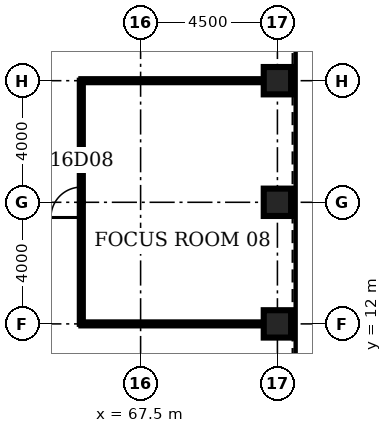
"""IFC4 building model, lengths in metres.
Left out: names, types, materials, properties, quantities, classifications, styles, units other than length and angle.
Written with IfcOpenShell. Run it as: python <this file> out.ifc"""

import sys

from ifc_helpers import new_model, si_unit, direction, frame, frame_2d, origin, origin_2d, place, context, subcontext, project, spatial, rectangle, hollow_rectangle, extrude, element, fill, save


model = new_model("IFC4")
c1 = context("Model", 3, precision=1e-05, world=origin(), true_north=direction((0.0, 1.0)))
c2 = subcontext(c1, "Body", "Model", "MODEL_VIEW")
j1 = project(units=[si_unit("LENGTHUNIT", "METRE"), si_unit("PLANEANGLEUNIT", "RADIAN")], contexts=[c1])
p1 = place(None, origin())
s1 = spatial("IfcSite", under=j1, at=p1, CompositionType="ELEMENT")
p2 = place(p1, origin())
s2 = spatial("IfcBuilding", under=s1, at=p2, CompositionType="ELEMENT")
p3 = place(p2, frame((0.0, 0.0, 77.0)))
s3 = spatial("IfcBuildingStorey", under=s2, at=p3, CompositionType="ELEMENT", Elevation=77.0)
for number, where, z_axis, x_axis in (
    (1, (72.0, 12.0, 0.0), (0.0, 0.0, 1.0), (1.0, 0.0, 0.0)),
    (2, (72.0, 16.0, 0.0), (0.0, 0.0, 1.0), (1.0, 0.0, 0.0)),
    (3, (72.0, 20.0, 0.0), (0.0, 0.0, 1.0), (1.0, 0.0, 0.0)),
):
    element("IfcColumn", number, at=place(p3, frame(where, z_axis=z_axis, x_axis=x_axis)), inside=s3, PredefinedType="COLUMN", context=c2, shape_type="SweptSolid", body=[
        extrude(hollow_rectangle(XDim=0.9, YDim=0.9, WallThickness=0.11, at=origin_2d()), origin(), (0.0, 0.0, 1.0), 4.5),
    ])
for number, where, z_axis, x_axis in (
    (4, (65.55, 12.0, 0.0), (0.0, 0.0, 1.0), (1.0, 0.0, 0.0)),
    (5, (65.55, 20.0, 0.0), (0.0, 0.0, 1.0), (1.0, 0.0, 0.0)),
):
    element("IfcWall", number, at=place(p3, frame(where, z_axis=z_axis, x_axis=x_axis)), inside=s3, PredefinedType="PARTITIONING", context=c2, shape_type="SweptSolid", body=[
        extrude(rectangle(XDim=6.0, YDim=0.1, at=frame_2d((3.0, 0.0))), origin(), (0.0, 0.0, 1.0), 3.0),
    ])
p4 = place(p3, frame((65.55, 12.0, 0.0), z_axis=(0.0, 0.0, 1.0), x_axis=(0.0, 1.0, 0.0)))
e6 = element("IfcWall", 6, at=p4, inside=s3, PredefinedType="PARTITIONING", context=c2, shape_type="SweptSolid", body=[
    extrude(rectangle(XDim=8.0, YDim=0.1, at=frame_2d((4.0, 0.0))), origin(), (0.0, 0.0, 1.0), 3.0),
])
p5 = place(p4, frame((3.5, 0.0, 0.0)))
e7 = element("IfcOpeningElement", 7, at=p5, cuts=e6, PredefinedType="OPENING", context=c2, shape_type="SweptSolid", body=[
    extrude(rectangle(XDim=1.0, YDim=2.1, at=frame_2d((0.5, 1.05))), frame((0.0, 0.06, 0.0), z_axis=(0.0, -1.0, 0.0), x_axis=(1.0, 0.0, 0.0)), (0.0, 0.0, 1.0), 0.12),
])
p6 = place(p5, origin())
e8 = element("IfcDoor", 8, at=p6, inside=s3, OperationType="SINGLE_SWING_LEFT", PredefinedType="DOOR", context=c2, shape_type="SweptSolid", body=[
    extrude(rectangle(XDim=1.0, YDim=2.1, at=frame_2d((0.5, 1.05))), frame((0.0, 0.025, 0.0), z_axis=(0.0, -1.0, 0.0), x_axis=(1.0, 0.0, 0.0)), (0.0, 0.0, 1.0), 0.05),
])
fill(e7, e8)
save(model, sys.argv[1])
